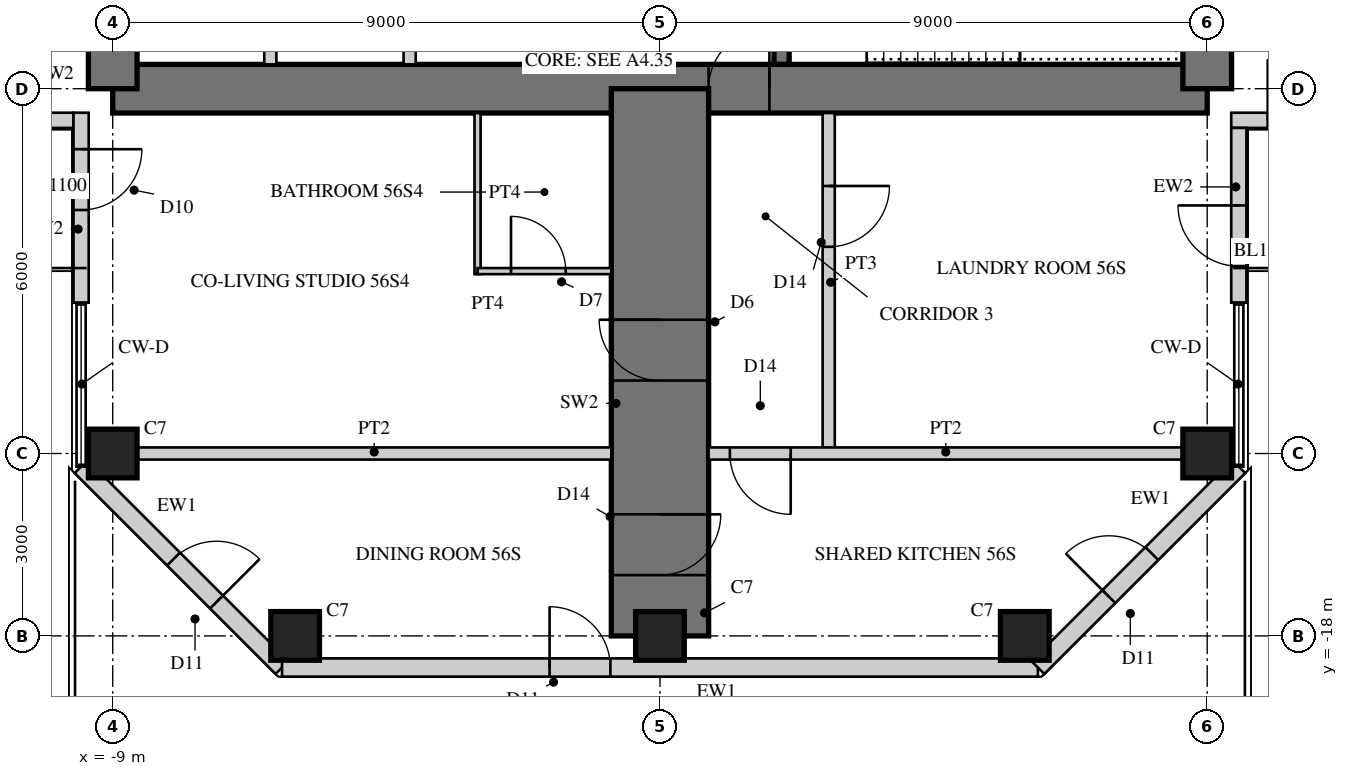
"""IFC4 building model, lengths in metres.
Left out: names, types, materials, properties, quantities, classifications, styles, units other than length and angle.
Written with IfcOpenShell. Run it as: python <this file> out.ifc"""

import sys

from ifc_helpers import new_model, si_unit, direction, frame, frame_2d, origin, origin_2d, place, context, subcontext, project, spatial, rectangle, hollow_rectangle, extrude, element, fill, save


model = new_model("IFC4")
c1 = context("Model", 3, precision=1e-05, world=origin(), true_north=direction((0.0, 1.0)))
c2 = subcontext(c1, "Body", "Model", "MODEL_VIEW")
j1 = project(units=[si_unit("LENGTHUNIT", "METRE"), si_unit("PLANEANGLEUNIT", "RADIAN")], contexts=[c1])
p1 = place(None, origin())
s1 = spatial("IfcSite", under=j1, at=p1, CompositionType="ELEMENT")
p2 = place(p1, origin())
s2 = spatial("IfcBuilding", under=s1, at=p2, CompositionType="ELEMENT")
p3 = place(p2, frame((0.0, 0.0, 222.1)))
s3 = spatial("IfcBuildingStorey", under=s2, at=p3, CompositionType="ELEMENT", Elevation=222.1)
p4 = place(p3, frame((-9.0, -9.0, 0.0), z_axis=(0.0, 0.0, 1.0), x_axis=(1.0, 0.0, 0.0)))
e1 = element("IfcWall", 1, at=p4, inside=s3, PredefinedType="SHEAR", context=c2, shape_type="SweptSolid", body=[
    extrude(rectangle(XDim=18.0, YDim=0.8, at=frame_2d((9.0, 0.0))), origin(), (0.0, 0.0, 1.0), 3.4),
])
p5 = place(p4, frame((9.8, 0.0, 0.0)))
e2 = element("IfcOpeningElement", 2, at=p5, cuts=e1, PredefinedType="OPENING", context=c2, shape_type="SweptSolid", body=[
    extrude(rectangle(XDim=1.0, YDim=2.4, at=frame_2d((0.5, 1.2))), frame((0.0, 0.41, 0.0), z_axis=(0.0, -1.0, 0.0), x_axis=(1.0, 0.0, 0.0)), (0.0, 0.0, 1.0), 0.82),
])
p6 = place(p3, frame((9.0, -9.0, 0.0), z_axis=(0.0, 0.0, 1.0), x_axis=(0.0, 1.0, 0.0)))
e3 = element("IfcWall", 3, at=p6, inside=s3, PredefinedType="SHEAR", context=c2, shape_type="SweptSolid", body=[
    extrude(rectangle(XDim=18.0, YDim=0.8, at=frame_2d((9.0, 0.0))), origin(), (0.0, 0.0, 1.0), 3.4),
])
p7 = place(p6, frame((9.8, 0.0, 0.0)))
e4 = element("IfcOpeningElement", 4, at=p7, cuts=e3, PredefinedType="OPENING", context=c2, shape_type="SweptSolid", body=[
    extrude(rectangle(XDim=1.0, YDim=2.4, at=frame_2d((0.5, 1.2))), frame((0.0, 0.41, 0.0), z_axis=(0.0, -1.0, 0.0), x_axis=(1.0, 0.0, 0.0)), (0.0, 0.0, 1.0), 0.82),
])
p8 = place(p3, frame((-9.0, 9.0, 0.0), z_axis=(0.0, 0.0, 1.0), x_axis=(0.0, -1.0, 0.0)))
e5 = element("IfcWall", 5, at=p8, inside=s3, PredefinedType="SHEAR", context=c2, shape_type="SweptSolid", body=[
    extrude(rectangle(XDim=18.0, YDim=0.8, at=frame_2d((9.0, 0.0))), origin(), (0.0, 0.0, 1.0), 3.4),
])
p9 = place(p8, frame((9.8, 0.0, 0.0)))
e6 = element("IfcOpeningElement", 6, at=p9, cuts=e5, PredefinedType="OPENING", context=c2, shape_type="SweptSolid", body=[
    extrude(rectangle(XDim=1.0, YDim=2.4, at=frame_2d((0.5, 1.2))), frame((0.0, 0.41, 0.0), z_axis=(0.0, -1.0, 0.0), x_axis=(1.0, 0.0, 0.0)), (0.0, 0.0, 1.0), 0.82),
])
p10 = place(p3, frame((-1.8, -1.875, 0.0), z_axis=(0.0, 0.0, 1.0), x_axis=(0.0, -1.0, 0.0)))
e7 = element("IfcWall", 7, at=p10, inside=s3, PredefinedType="SHEAR", context=c2, shape_type="SweptSolid", body=[
    extrude(rectangle(XDim=6.725, YDim=0.25, at=frame_2d((3.363, 0.0))), origin(), (0.0, 0.0, 1.0), 3.4),
])
p11 = place(p10, frame((1.875, 0.0, 0.0)))
e8 = element("IfcOpeningElement", 8, at=p11, cuts=e7, PredefinedType="OPENING", context=c2, shape_type="SweptSolid", body=[
    extrude(rectangle(XDim=1.6, YDim=2.4, at=frame_2d((0.8, 1.2))), frame((0.0, 0.135, 0.0), z_axis=(0.0, -1.0, 0.0), x_axis=(1.0, 0.0, 0.0)), (0.0, 0.0, 1.0), 0.27),
])
for number, where, z_axis, x_axis in (
    (9, (-4.117, -5.975, 0.0), (0.0, 0.0, 1.0), (0.0, -1.0, 0.0)),
    (10, (-6.408, -5.975, 0.0), (0.0, 0.0, 1.0), (0.0, -1.0, 0.0)),
):
    element("IfcWall", number, at=place(p3, frame(where, z_axis=z_axis, x_axis=x_axis)), inside=s3, PredefinedType="PARTITIONING", context=c2, shape_type="SweptSolid", body=[
        extrude(rectangle(XDim=2.625, YDim=0.2, at=frame_2d((1.312, 0.0))), origin(), (0.0, 0.0, 1.0), 3.4),
    ])
p12 = place(p3, frame((2.0, -1.675, 0.0), z_axis=(0.0, 0.0, 1.0), x_axis=(0.0, -1.0, 0.0)))
e11 = element("IfcWall", 11, at=p12, inside=s3, PredefinedType="SHEAR", context=c2, shape_type="SweptSolid", body=[
    extrude(rectangle(XDim=6.925, YDim=0.25, at=frame_2d((3.462, 0.0))), origin(), (0.0, 0.0, 1.0), 3.4),
])
p13 = place(p12, frame((0.725, 0.0, 0.0)))
e12 = element("IfcOpeningElement", 12, at=p13, cuts=e11, PredefinedType="OPENING", context=c2, shape_type="SweptSolid", body=[
    extrude(rectangle(XDim=1.0, YDim=2.1, at=frame_2d((0.5, 1.05))), frame((0.0, 0.135, 0.0), z_axis=(0.0, -1.0, 0.0), x_axis=(1.0, 0.0, 0.0)), (0.0, 0.0, 1.0), 0.27),
])
p14 = place(p3, frame((0.0, -9.0, 0.0), z_axis=(0.0, 0.0, 1.0), x_axis=(0.0, -1.0, 0.0)))
e13 = element("IfcWall", 13, at=p14, inside=s3, PredefinedType="SHEAR", context=c2, shape_type="SweptSolid", body=[
    extrude(rectangle(XDim=9.0, YDim=1.6, at=frame_2d((4.5, 0.0))), origin(), (0.0, 0.0, 1.0), 3.4),
])
p15 = place(p14, frame((3.8, 0.0, 0.0)))
e14 = element("IfcOpeningElement", 14, at=p15, cuts=e13, PredefinedType="OPENING", context=c2, shape_type="SweptSolid", body=[
    extrude(rectangle(XDim=1.0, YDim=2.15, at=frame_2d((0.5, 1.075))), frame((0.0, 0.81, 0.0), z_axis=(0.0, -1.0, 0.0), x_axis=(1.0, 0.0, 0.0)), (0.0, 0.0, 1.0), 1.62),
])
p16 = place(p14, frame((7.0, 0.0, 0.0)))
e15 = element("IfcOpeningElement", 15, at=p16, cuts=e13, PredefinedType="OPENING", context=c2, shape_type="SweptSolid", body=[
    extrude(rectangle(XDim=1.0, YDim=2.2, at=frame_2d((0.5, 1.1))), frame((0.0, 0.81, 0.0), z_axis=(0.0, -1.0, 0.0), x_axis=(1.0, 0.0, 0.0)), (0.0, 0.0, 1.0), 1.62),
])
for number, where, z_axis, x_axis in (
    (16, (-9.0, -15.0, 0.0), (0.0, 0.0, 1.0), (1.0, 0.0, 0.0)),
    (17, (9.0, -15.0, 0.0), (0.0, 0.0, 1.0), (1.0, 0.0, 0.0)),
    (18, (-6.0, -18.0, 0.0), (0.0, 0.0, 1.0), (1.0, 0.0, 0.0)),
    (19, (0.0, -18.0, 0.0), (0.0, 0.0, 1.0), (1.0, 0.0, 0.0)),
    (20, (6.0, -18.0, 0.0), (0.0, 0.0, 1.0), (1.0, 0.0, 0.0)),
):
    element("IfcColumn", number, at=place(p3, frame(where, z_axis=z_axis, x_axis=x_axis)), inside=s3, PredefinedType="COLUMN", context=c2, shape_type="SweptSolid", body=[
        extrude(rectangle(XDim=0.8, YDim=0.8, at=origin_2d()), origin(), (0.0, 0.0, 1.0), 3.4),
    ])
p17 = place(p3, frame((9.395, -9.52, 0.0), z_axis=(0.0, 0.0, 1.0), x_axis=(1.0, 0.0, 0.0)))
e21 = element("IfcWall", 21, at=p17, inside=s3, PredefinedType="SOLIDWALL", context=c2, shape_type="SweptSolid", body=[
    extrude(rectangle(XDim=3.125, YDim=0.25, at=frame_2d((1.562, 0.0))), origin(), (0.0, 0.0, 1.0), 3.22),
])
p18 = place(p17, frame((0.6, 0.0, 0.0)))
e22 = element("IfcOpeningElement", 22, at=p18, cuts=e21, PredefinedType="OPENING", context=c2, shape_type="SweptSolid", body=[
    extrude(rectangle(XDim=1.0, YDim=2.2, at=frame_2d((0.5, 1.1))), frame((0.0, 0.135, 0.0), z_axis=(0.0, -1.0, 0.0), x_axis=(1.0, 0.0, 0.0)), (0.0, 0.0, 1.0), 0.27),
])
p19 = place(p3, frame((-12.52, -9.52, 0.0), z_axis=(0.0, 0.0, 1.0), x_axis=(1.0, 0.0, 0.0)))
e23 = element("IfcWall", 23, at=p19, inside=s3, PredefinedType="SOLIDWALL", context=c2, shape_type="SweptSolid", body=[
    extrude(rectangle(XDim=2.875, YDim=0.25, at=frame_2d((1.438, 0.0))), origin(), (0.0, 0.0, 1.0), 3.22),
])
p20 = place(p19, frame((0.6, 0.0, 0.0)))
e24 = element("IfcOpeningElement", 24, at=p20, cuts=e23, PredefinedType="OPENING", context=c2, shape_type="SweptSolid", body=[
    extrude(rectangle(XDim=1.0, YDim=2.2, at=frame_2d((0.5, 1.1))), frame((0.0, 0.135, 0.0), z_axis=(0.0, -1.0, 0.0), x_axis=(1.0, 0.0, 0.0)), (0.0, 0.0, 1.0), 0.27),
])
p21 = place(p3, frame((-9.52, -9.395, 0.0), z_axis=(0.0, 0.0, 1.0), x_axis=(0.0, -1.0, 0.0)))
e25 = element("IfcWall", 25, at=p21, inside=s3, PredefinedType="SOLIDWALL", context=c2, shape_type="SweptSolid", body=[
    extrude(rectangle(XDim=3.125, YDim=0.25, at=frame_2d((1.562, 0.0))), origin(), (0.0, 0.0, 1.0), 3.22),
])
p22 = place(p21, frame((0.6, 0.0, 0.0)))
e26 = element("IfcOpeningElement", 26, at=p22, cuts=e25, PredefinedType="OPENING", context=c2, shape_type="SweptSolid", body=[
    extrude(rectangle(XDim=1.0, YDim=2.2, at=frame_2d((0.5, 1.1))), frame((0.0, 0.135, 0.0), z_axis=(0.0, -1.0, 0.0), x_axis=(1.0, 0.0, 0.0)), (0.0, 0.0, 1.0), 0.27),
])
p23 = place(p3, frame((-9.52, -15.215, 0.0), z_axis=(0.0, 0.0, 1.0), x_axis=(0.707106781187, -0.707106781187, 0.0)))
e27 = element("IfcWall", 27, at=p23, inside=s3, PredefinedType="SOLIDWALL", context=c2, shape_type="SweptSolid", body=[
    extrude(rectangle(XDim=4.674, YDim=0.3, at=frame_2d((2.337, 0.0))), origin(), (0.0, 0.0, 1.0), 3.22),
])
p24 = place(p23, frame((2.15, 0.0, 0.0)))
e28 = element("IfcOpeningElement", 28, at=p24, cuts=e27, PredefinedType="OPENING", context=c2, shape_type="SweptSolid", body=[
    extrude(rectangle(XDim=1.0, YDim=2.4, at=frame_2d((0.5, 1.2))), frame((0.0, 0.16, 0.0), z_axis=(0.0, -1.0, 0.0), x_axis=(1.0, 0.0, 0.0)), (0.0, 0.0, 1.0), 0.32),
])
p25 = place(p3, frame((-6.215, -18.52, 0.0), z_axis=(0.0, 0.0, 1.0), x_axis=(1.0, 0.0, 0.0)))
e29 = element("IfcWall", 29, at=p25, inside=s3, PredefinedType="SOLIDWALL", context=c2, shape_type="SweptSolid", body=[
    extrude(rectangle(XDim=12.431, YDim=0.3, at=frame_2d((6.215, 0.0))), origin(), (0.0, 0.0, 1.0), 3.22),
])
p26 = place(p25, frame((4.4, 0.0, 0.0)))
e30 = element("IfcOpeningElement", 30, at=p26, cuts=e29, PredefinedType="OPENING", context=c2, shape_type="SweptSolid", body=[
    extrude(rectangle(XDim=1.0, YDim=2.4, at=frame_2d((0.5, 1.2))), frame((0.0, 0.16, 0.0), z_axis=(0.0, -1.0, 0.0), x_axis=(1.0, 0.0, 0.0)), (0.0, 0.0, 1.0), 0.32),
])
p27 = place(p3, frame((6.215, -18.52, 0.0), z_axis=(0.0, 0.0, 1.0), x_axis=(0.707106781187, 0.707106781187, 0.0)))
e31 = element("IfcWall", 31, at=p27, inside=s3, PredefinedType="SOLIDWALL", context=c2, shape_type="SweptSolid", body=[
    extrude(rectangle(XDim=4.674, YDim=0.3, at=frame_2d((2.337, 0.0))), origin(), (0.0, 0.0, 1.0), 3.22),
])
p28 = place(p27, frame((1.65, 0.0, 0.0)))
e32 = element("IfcOpeningElement", 32, at=p28, cuts=e31, PredefinedType="OPENING", context=c2, shape_type="SweptSolid", body=[
    extrude(rectangle(XDim=1.0, YDim=2.4, at=frame_2d((0.5, 1.2))), frame((0.0, 0.16, 0.0), z_axis=(0.0, -1.0, 0.0), x_axis=(1.0, 0.0, 0.0)), (0.0, 0.0, 1.0), 0.32),
])
p29 = place(p3, frame((9.52, -12.52, 0.0), z_axis=(0.0, 0.0, 1.0), x_axis=(0.0, 1.0, 0.0)))
e33 = element("IfcWall", 33, at=p29, inside=s3, PredefinedType="SOLIDWALL", context=c2, shape_type="SweptSolid", body=[
    extrude(rectangle(XDim=2.875, YDim=0.25, at=frame_2d((1.438, 0.0))), origin(), (0.0, 0.0, 1.0), 3.22),
])
p30 = place(p29, frame((0.6, 0.0, 0.0)))
e34 = element("IfcOpeningElement", 34, at=p30, cuts=e33, PredefinedType="OPENING", context=c2, shape_type="SweptSolid", body=[
    extrude(rectangle(XDim=1.0, YDim=2.2, at=frame_2d((0.5, 1.1))), frame((0.0, 0.135, 0.0), z_axis=(0.0, -1.0, 0.0), x_axis=(1.0, 0.0, 0.0)), (0.0, 0.0, 1.0), 0.27),
])
p31 = place(p3, frame((-3.0, -9.4, 0.0), z_axis=(0.0, 0.0, 1.0), x_axis=(0.0, -1.0, 0.0)))
e35 = element("IfcWall", 35, at=p31, inside=s3, PredefinedType="PARTITIONING", context=c2, shape_type="SweptSolid", body=[
    extrude(rectangle(XDim=2.65, YDim=0.1, at=frame_2d((1.325, 0.0))), origin(), (0.0, 0.0, 1.0), 3.22),
])
p32 = place(p3, frame((-3.0, -12.0, 0.0), z_axis=(0.0, 0.0, 1.0), x_axis=(1.0, 0.0, 0.0)))
e36 = element("IfcWall", 36, at=p32, inside=s3, PredefinedType="PARTITIONING", context=c2, shape_type="SweptSolid", body=[
    extrude(rectangle(XDim=2.2, YDim=0.1, at=frame_2d((1.1, 0.0))), origin(), (0.0, 0.0, 1.0), 3.22),
])
p33 = place(p32, frame((0.55, 0.0, 0.0)))
e37 = element("IfcOpeningElement", 37, at=p33, cuts=e36, PredefinedType="OPENING", context=c2, shape_type="SweptSolid", body=[
    extrude(rectangle(XDim=0.9, YDim=2.1, at=frame_2d((0.45, 1.05))), frame((0.0, 0.06, 0.0), z_axis=(0.0, -1.0, 0.0), x_axis=(1.0, 0.0, 0.0)), (0.0, 0.0, 1.0), 0.12),
])
p34 = place(p3, frame((2.775, -9.4, 0.0), z_axis=(0.0, 0.0, 1.0), x_axis=(0.0, -1.0, 0.0)))
e38 = element("IfcWall", 38, at=p34, inside=s3, PredefinedType="SOLIDWALL", context=c2, shape_type="SweptSolid", body=[
    extrude(rectangle(XDim=5.6, YDim=0.2, at=frame_2d((2.8, 0.0))), origin(), (0.0, 0.0, 1.0), 3.22),
])
p35 = place(p34, frame((1.2, 0.0, 0.0)))
e39 = element("IfcOpeningElement", 39, at=p35, cuts=e38, PredefinedType="OPENING", context=c2, shape_type="SweptSolid", body=[
    extrude(rectangle(XDim=1.0, YDim=2.2, at=frame_2d((0.5, 1.1))), frame((0.0, 0.11, 0.0), z_axis=(0.0, -1.0, 0.0), x_axis=(1.0, 0.0, 0.0)), (0.0, 0.0, 1.0), 0.22),
])
p36 = place(p3, frame((-8.6, -15.0, 0.0), z_axis=(0.0, 0.0, 1.0), x_axis=(1.0, 0.0, 0.0)))
e40 = element("IfcWall", 40, at=p36, inside=s3, PredefinedType="SOLIDWALL", context=c2, shape_type="SweptSolid", body=[
    extrude(rectangle(XDim=7.8, YDim=0.2, at=frame_2d((3.9, 0.0))), origin(), (0.0, 0.0, 1.0), 2.52),
])
p37 = place(p3, frame((0.8, -15.0, 0.0), z_axis=(0.0, 0.0, 1.0), x_axis=(1.0, 0.0, 0.0)))
e41 = element("IfcWall", 41, at=p37, inside=s3, PredefinedType="SOLIDWALL", context=c2, shape_type="SweptSolid", body=[
    extrude(rectangle(XDim=7.8, YDim=0.2, at=frame_2d((3.9, 0.0))), origin(), (0.0, 0.0, 1.0), 2.52),
])
p38 = place(p37, frame((0.35, 0.0, 0.0)))
e42 = element("IfcOpeningElement", 42, at=p38, cuts=e41, PredefinedType="OPENING", context=c2, shape_type="SweptSolid", body=[
    extrude(rectangle(XDim=1.0, YDim=2.2, at=frame_2d((0.5, 1.1))), frame((0.0, 0.11, 0.0), z_axis=(0.0, -1.0, 0.0), x_axis=(1.0, 0.0, 0.0)), (0.0, 0.0, 1.0), 0.22),
])
p39 = place(p18, origin())
e43 = element("IfcDoor", 43, at=p39, inside=s3, OperationType="SINGLE_SWING_LEFT", PredefinedType="DOOR", context=c2, shape_type="SweptSolid", body=[
    extrude(hollow_rectangle(XDim=1.0, YDim=2.2, WallThickness=0.06, at=frame_2d((0.5, 1.1))), frame((0.0, 0.025, 0.0), z_axis=(0.0, -1.0, 0.0), x_axis=(1.0, 0.0, 0.0)), (0.0, 0.0, 1.0), 0.05),
    extrude(rectangle(XDim=0.879, YDim=2.079, at=frame_2d((0.5, 1.1))), frame((0.0, 0.025, 0.0), z_axis=(0.0, -1.0, 0.0), x_axis=(1.0, 0.0, 0.0)), (0.0, 0.0, 1.0), 0.05),
])
fill(e22, e43)
p40 = place(p22, origin())
e44 = element("IfcDoor", 44, at=p40, inside=s3, OperationType="SINGLE_SWING_LEFT", PredefinedType="DOOR", context=c2, shape_type="SweptSolid", body=[
    extrude(hollow_rectangle(XDim=1.0, YDim=2.2, WallThickness=0.06, at=frame_2d((0.5, 1.1))), frame((0.0, 0.025, 0.0), z_axis=(0.0, -1.0, 0.0), x_axis=(1.0, 0.0, 0.0)), (0.0, 0.0, 1.0), 0.05),
    extrude(rectangle(XDim=0.879, YDim=2.079, at=frame_2d((0.5, 1.1))), frame((0.0, 0.025, 0.0), z_axis=(0.0, -1.0, 0.0), x_axis=(1.0, 0.0, 0.0)), (0.0, 0.0, 1.0), 0.05),
])
fill(e26, e44)
p41 = place(p24, origin())
e45 = element("IfcDoor", 45, at=p41, inside=s3, OperationType="SINGLE_SWING_RIGHT", PredefinedType="DOOR", context=c2, shape_type="SweptSolid", body=[
    extrude(hollow_rectangle(XDim=1.0, YDim=2.4, WallThickness=0.06, at=frame_2d((0.5, 1.2))), frame((0.0, 0.025, 0.0), z_axis=(0.0, -1.0, 0.0), x_axis=(1.0, 0.0, 0.0)), (0.0, 0.0, 1.0), 0.05),
    extrude(rectangle(XDim=0.879, YDim=2.279, at=frame_2d((0.5, 1.2))), frame((0.0, 0.025, 0.0), z_axis=(0.0, -1.0, 0.0), x_axis=(1.0, 0.0, 0.0)), (0.0, 0.0, 1.0), 0.05),
])
fill(e28, e45)
p42 = place(p26, origin())
e46 = element("IfcDoor", 46, at=p42, inside=s3, OperationType="SINGLE_SWING_LEFT", PredefinedType="DOOR", context=c2, shape_type="SweptSolid", body=[
    extrude(hollow_rectangle(XDim=1.0, YDim=2.4, WallThickness=0.06, at=frame_2d((0.5, 1.2))), frame((0.0, 0.025, 0.0), z_axis=(0.0, -1.0, 0.0), x_axis=(1.0, 0.0, 0.0)), (0.0, 0.0, 1.0), 0.05),
    extrude(rectangle(XDim=0.879, YDim=2.279, at=frame_2d((0.5, 1.2))), frame((0.0, 0.025, 0.0), z_axis=(0.0, -1.0, 0.0), x_axis=(1.0, 0.0, 0.0)), (0.0, 0.0, 1.0), 0.05),
])
fill(e30, e46)
p43 = place(p28, origin())
e47 = element("IfcDoor", 47, at=p43, inside=s3, OperationType="SINGLE_SWING_LEFT", PredefinedType="DOOR", context=c2, shape_type="SweptSolid", body=[
    extrude(hollow_rectangle(XDim=1.0, YDim=2.4, WallThickness=0.06, at=frame_2d((0.5, 1.2))), frame((0.0, 0.025, 0.0), z_axis=(0.0, -1.0, 0.0), x_axis=(1.0, 0.0, 0.0)), (0.0, 0.0, 1.0), 0.05),
    extrude(rectangle(XDim=0.879, YDim=2.279, at=frame_2d((0.5, 1.2))), frame((0.0, 0.025, 0.0), z_axis=(0.0, -1.0, 0.0), x_axis=(1.0, 0.0, 0.0)), (0.0, 0.0, 1.0), 0.05),
])
fill(e32, e47)
p44 = place(p30, origin())
e48 = element("IfcDoor", 48, at=p44, inside=s3, OperationType="SINGLE_SWING_RIGHT", PredefinedType="DOOR", context=c2, shape_type="SweptSolid", body=[
    extrude(hollow_rectangle(XDim=1.0, YDim=2.2, WallThickness=0.06, at=frame_2d((0.5, 1.1))), frame((0.0, 0.025, 0.0), z_axis=(0.0, -1.0, 0.0), x_axis=(1.0, 0.0, 0.0)), (0.0, 0.0, 1.0), 0.05),
    extrude(rectangle(XDim=0.879, YDim=2.079, at=frame_2d((0.5, 1.1))), frame((0.0, 0.025, 0.0), z_axis=(0.0, -1.0, 0.0), x_axis=(1.0, 0.0, 0.0)), (0.0, 0.0, 1.0), 0.05),
])
fill(e34, e48)
p45 = place(p33, origin())
e49 = element("IfcDoor", 49, at=p45, inside=s3, OperationType="SINGLE_SWING_LEFT", PredefinedType="DOOR", context=c2, shape_type="SweptSolid", body=[
    extrude(rectangle(XDim=0.9, YDim=2.1, at=frame_2d((0.45, 1.05))), frame((0.0, 0.025, 0.0), z_axis=(0.0, -1.0, 0.0), x_axis=(1.0, 0.0, 0.0)), (0.0, 0.0, 1.0), 0.05),
])
fill(e37, e49)
p46 = place(p35, origin())
e50 = element("IfcDoor", 50, at=p46, inside=s3, OperationType="SINGLE_SWING_LEFT", PredefinedType="DOOR", context=c2, shape_type="SweptSolid", body=[
    extrude(rectangle(XDim=1.0, YDim=2.2, at=frame_2d((0.5, 1.1))), frame((0.0, 0.025, 0.0), z_axis=(0.0, -1.0, 0.0), x_axis=(1.0, 0.0, 0.0)), (0.0, 0.0, 1.0), 0.05),
])
fill(e39, e50)
p47 = place(p38, frame((1.0, 0.0, 0.0), z_axis=(0.0, 0.0, 1.0), x_axis=(-1.0, 0.0, 0.0)))
e51 = element("IfcDoor", 51, at=p47, inside=s3, OperationType="SINGLE_SWING_LEFT", PredefinedType="DOOR", context=c2, shape_type="SweptSolid", body=[
    extrude(rectangle(XDim=1.0, YDim=2.2, at=frame_2d((0.5, 1.1))), frame((0.0, 0.025, 0.0), z_axis=(0.0, -1.0, 0.0), x_axis=(1.0, 0.0, 0.0)), (0.0, 0.0, 1.0), 0.05),
])
fill(e42, e51)
p48 = place(p15, frame((1.0, 0.0, 0.0), z_axis=(0.0, 0.0, 1.0), x_axis=(-1.0, 0.0, 0.0)))
e52 = element("IfcDoor", 52, at=p48, inside=s3, OperationType="SINGLE_SWING_RIGHT", PredefinedType="DOOR", context=c2, shape_type="SweptSolid", body=[
    extrude(rectangle(XDim=1.0, YDim=2.15, at=frame_2d((0.5, 1.075))), frame((0.0, 0.025, 0.0), z_axis=(0.0, -1.0, 0.0), x_axis=(1.0, 0.0, 0.0)), (0.0, 0.0, 1.0), 0.05),
])
fill(e14, e52)
p49 = place(p16, origin())
e53 = element("IfcDoor", 53, at=p49, inside=s3, OperationType="SINGLE_SWING_LEFT", PredefinedType="DOOR", context=c2, shape_type="SweptSolid", body=[
    extrude(rectangle(XDim=1.0, YDim=2.2, at=frame_2d((0.5, 1.1))), frame((0.0, 0.025, 0.0), z_axis=(0.0, -1.0, 0.0), x_axis=(1.0, 0.0, 0.0)), (0.0, 0.0, 1.0), 0.05),
])
fill(e15, e53)
p50 = place(p5, origin())
e54 = element("IfcDoor", 54, at=p50, inside=s3, OperationType="SINGLE_SWING_RIGHT", PredefinedType="DOOR", context=c2, shape_type="SweptSolid", body=[
    extrude(rectangle(XDim=1.0, YDim=2.4, at=frame_2d((0.5, 1.2))), frame((0.0, 0.055, 0.0), z_axis=(0.0, -1.0, 0.0), x_axis=(1.0, 0.0, 0.0)), (0.0, 0.0, 1.0), 0.05),
])
fill(e2, e54)
save(model, sys.argv[1])
